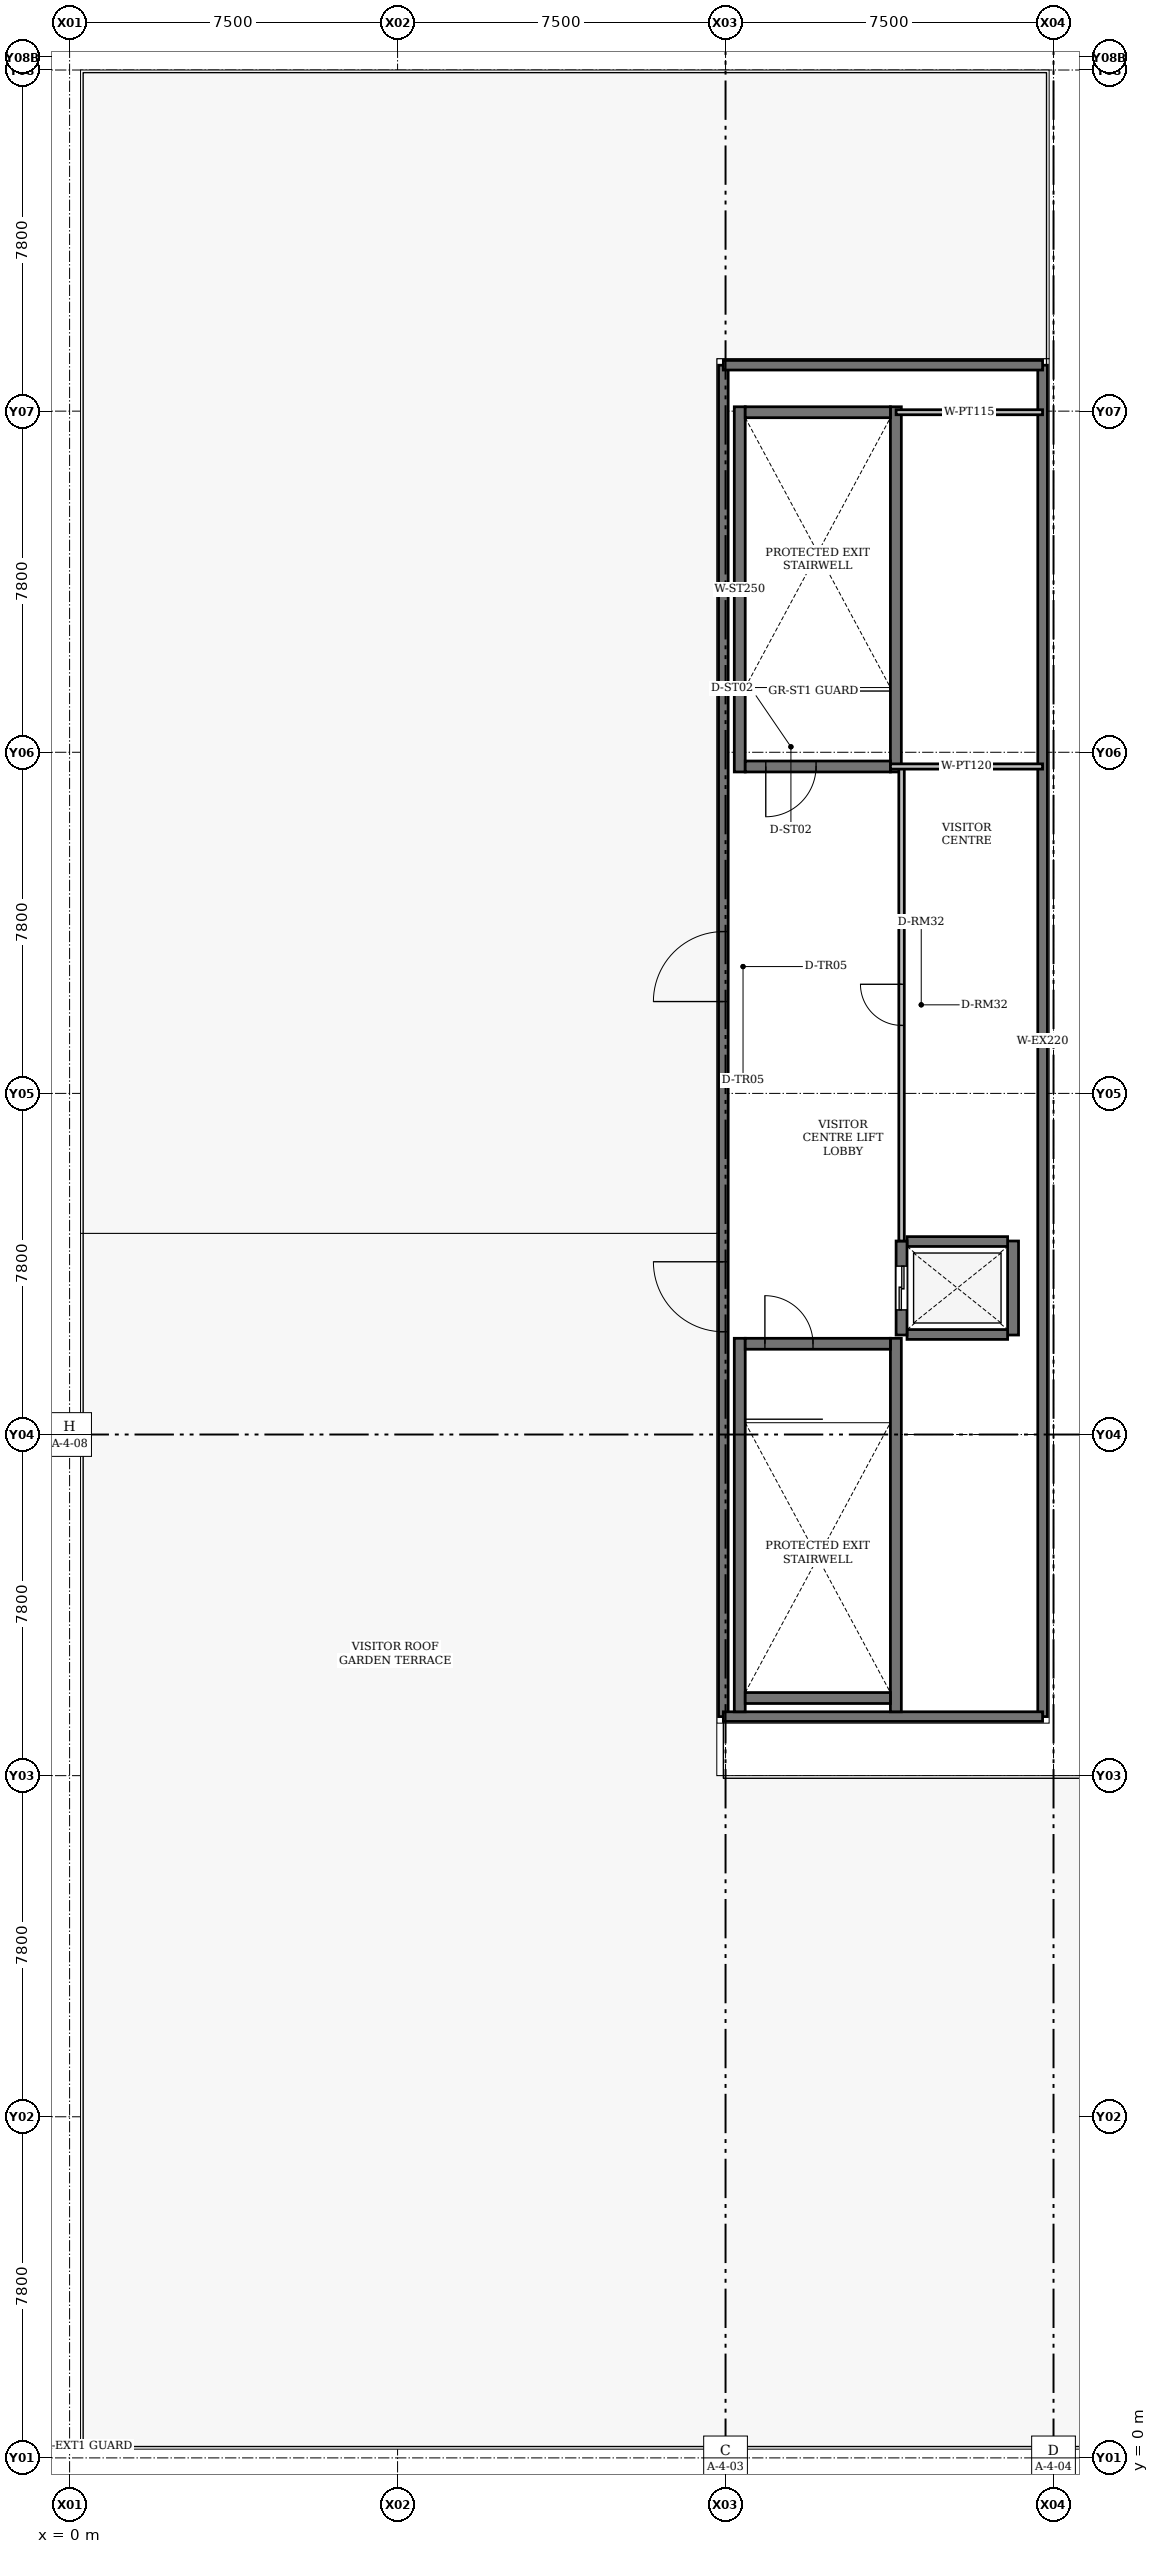
"""IFC4 building model, lengths in metres.
Left out: names, types, materials, properties, quantities, classifications, styles, units other than length and angle.
Written with IfcOpenShell. Run it as: python <this file> out.ifc"""

import sys

from ifc_helpers import new_model, si_unit, direction, frame, frame_2d, origin, place, context, subcontext, project, spatial, rectangle, extrude, element, fill, save


model = new_model("IFC4")
c1 = context("Model", 3, precision=1e-05, world=origin(), true_north=direction((0.0, 1.0)))
c2 = subcontext(c1, "Body", "Model", "MODEL_VIEW")
j1 = project(units=[si_unit("LENGTHUNIT", "METRE"), si_unit("PLANEANGLEUNIT", "RADIAN")], contexts=[c1])
p1 = place(None, origin())
s1 = spatial("IfcSite", under=j1, at=p1, CompositionType="ELEMENT")
p2 = place(p1, origin())
s2 = spatial("IfcBuilding", under=s1, at=p2, CompositionType="ELEMENT")
p3 = place(p2, frame((0.0, 0.0, 18.3)))
s3 = spatial("IfcBuildingStorey", under=s2, at=p3, CompositionType="ELEMENT", Elevation=18.3)
p4 = place(p3, frame((14.95, 16.95, 0.0), z_axis=(0.0, 0.0, 1.0), x_axis=(0.0, 1.0, 0.0)))
e1 = element("IfcWall", 1, at=p4, inside=s3, PredefinedType="SOLIDWALL", context=c2, shape_type="SweptSolid", body=[
    extrude(rectangle(XDim=30.9, YDim=0.22, at=frame_2d((15.45, 0.0))), origin(), (0.0, 0.0, 1.0), 3.985),
])
p5 = place(p4, frame((8.8, 0.0, 0.0)))
e2 = element("IfcOpeningElement", 2, at=p5, cuts=e1, PredefinedType="OPENING", context=c2, shape_type="SweptSolid", body=[
    extrude(rectangle(XDim=1.6, YDim=2.3, at=frame_2d((0.8, 1.15))), frame((0.0, 0.11, 0.0), z_axis=(0.0, -1.0, 0.0), x_axis=(1.0, 0.0, 0.0)), (0.0, 0.0, 1.0), 0.22),
])
p6 = place(p4, frame((16.35, 0.0, 0.0)))
e3 = element("IfcOpeningElement", 3, at=p6, cuts=e1, PredefinedType="OPENING", context=c2, shape_type="SweptSolid", body=[
    extrude(rectangle(XDim=1.6, YDim=2.3, at=frame_2d((0.8, 1.15))), frame((0.0, 0.11, 0.0), z_axis=(0.0, -1.0, 0.0), x_axis=(1.0, 0.0, 0.0)), (0.0, 0.0, 1.0), 0.22),
])
p7 = place(p3, frame((22.25, 47.85, 0.0), z_axis=(0.0, 0.0, 1.0), x_axis=(0.0, -1.0, 0.0)))
e4 = element("IfcWall", 4, at=p7, inside=s3, PredefinedType="SOLIDWALL", context=c2, shape_type="SweptSolid", body=[
    extrude(rectangle(XDim=30.9, YDim=0.22, at=frame_2d((15.45, 0.0))), origin(), (0.0, 0.0, 1.0), 3.985),
])
for number, where, z_axis, x_axis in (
    (5, (14.95, 47.85, 0.0), (0.0, 0.0, 1.0), (1.0, 0.0, 0.0)),
    (6, (22.25, 16.95, 0.0), (0.0, 0.0, 1.0), (-1.0, 0.0, 0.0)),
):
    element("IfcWall", number, at=place(p3, frame(where, z_axis=z_axis, x_axis=x_axis)), inside=s3, PredefinedType="SOLIDWALL", context=c2, shape_type="SweptSolid", body=[
        extrude(rectangle(XDim=7.3, YDim=0.22, at=frame_2d((3.65, 0.0))), origin(), (0.0, 0.0, 1.0), 3.985),
    ])
for number, where, z_axis, x_axis in (
    (7, (15.325, 17.06, 0.0), (0.0, 0.0, 1.0), (0.0, 1.0, 0.0)),
    (8, (18.895, 17.06, 0.0), (0.0, 0.0, 1.0), (0.0, 1.0, 0.0)),
):
    element("IfcWall", number, at=place(p3, frame(where, z_axis=z_axis, x_axis=x_axis)), inside=s3, PredefinedType="SHEAR", context=c2, shape_type="SweptSolid", body=[
        extrude(rectangle(XDim=8.54, YDim=0.25, at=frame_2d((4.27, 0.0))), origin(), (0.0, 0.0, 1.0), 4.2),
    ])
p8 = place(p3, frame((15.45, 17.375, 0.0), z_axis=(0.0, 0.0, 1.0), x_axis=(1.0, 0.0, 0.0)))
e9 = element("IfcWall", 9, at=p8, inside=s3, PredefinedType="SHEAR", context=c2, shape_type="SweptSolid", body=[
    extrude(rectangle(XDim=3.32, YDim=0.25, at=frame_2d((1.66, 0.0))), origin(), (0.0, 0.0, 1.0), 4.2),
])
p9 = place(p3, frame((15.45, 25.475, 0.0), z_axis=(0.0, 0.0, 1.0), x_axis=(1.0, 0.0, 0.0)))
e10 = element("IfcWall", 10, at=p9, inside=s3, PredefinedType="SHEAR", context=c2, shape_type="SweptSolid", body=[
    extrude(rectangle(XDim=3.32, YDim=0.25, at=frame_2d((1.66, 0.0))), origin(), (0.0, 0.0, 1.0), 4.2),
])
p10 = place(p9, frame((0.45, 0.0, 0.0)))
e11 = element("IfcOpeningElement", 11, at=p10, cuts=e10, PredefinedType="OPENING", context=c2, shape_type="SweptSolid", body=[
    extrude(rectangle(XDim=1.1, YDim=2.15, at=frame_2d((0.55, 1.075))), frame((0.0, 0.125, 0.0), z_axis=(0.0, -1.0, 0.0), x_axis=(1.0, 0.0, 0.0)), (0.0, 0.0, 1.0), 0.25),
])
for number, where, z_axis, x_axis in (
    (12, (15.325, 38.55, 0.0), (0.0, 0.0, 1.0), (0.0, 1.0, 0.0)),
    (13, (18.895, 38.55, 0.0), (0.0, 0.0, 1.0), (0.0, 1.0, 0.0)),
):
    element("IfcWall", number, at=place(p3, frame(where, z_axis=z_axis, x_axis=x_axis)), inside=s3, PredefinedType="SHEAR", context=c2, shape_type="SweptSolid", body=[
        extrude(rectangle(XDim=8.35, YDim=0.25, at=frame_2d((4.175, 0.0))), origin(), (0.0, 0.0, 1.0), 4.2),
    ])
p11 = place(p3, frame((15.45, 46.775, 0.0), z_axis=(0.0, 0.0, 1.0), x_axis=(1.0, 0.0, 0.0)))
e14 = element("IfcWall", 14, at=p11, inside=s3, PredefinedType="SHEAR", context=c2, shape_type="SweptSolid", body=[
    extrude(rectangle(XDim=3.32, YDim=0.25, at=frame_2d((1.66, 0.0))), origin(), (0.0, 0.0, 1.0), 4.2),
])
p12 = place(p3, frame((18.77, 38.675, 0.0), z_axis=(0.0, 0.0, 1.0), x_axis=(-1.0, 0.0, 0.0)))
e15 = element("IfcWall", 15, at=p12, inside=s3, PredefinedType="SHEAR", context=c2, shape_type="SweptSolid", body=[
    extrude(rectangle(XDim=3.32, YDim=0.25, at=frame_2d((1.66, 0.0))), origin(), (0.0, 0.0, 1.0), 4.2),
])
p13 = place(p12, frame((1.7, 0.0, 0.0)))
e16 = element("IfcOpeningElement", 16, at=p13, cuts=e15, PredefinedType="OPENING", context=c2, shape_type="SweptSolid", body=[
    extrude(rectangle(XDim=1.15, YDim=2.15, at=frame_2d((0.575, 1.075))), frame((0.0, 0.125, 0.0), z_axis=(0.0, -1.0, 0.0), x_axis=(1.0, 0.0, 0.0)), (0.0, 0.0, 1.0), 0.25),
])
p14 = place(p3, frame((21.575, 25.675, 0.0), z_axis=(0.0, 0.0, 1.0), x_axis=(0.0, 1.0, 0.0)))
e17 = element("IfcWall", 17, at=p14, inside=s3, PredefinedType="SHEAR", context=c2, shape_type="SweptSolid", body=[
    extrude(rectangle(XDim=2.15, YDim=0.25, at=frame_2d((1.075, 0.0))), origin(), (0.0, 0.0, 1.0), 4.2),
])
for number, where, z_axis, x_axis in (
    (18, (19.15, 25.688, 0.0), (0.0, 0.0, 1.0), (1.0, 0.0, 0.0)),
    (19, (19.15, 27.812, 0.0), (0.0, 0.0, 1.0), (1.0, 0.0, 0.0)),
):
    element("IfcWall", number, at=place(p3, frame(where, z_axis=z_axis, x_axis=x_axis)), inside=s3, PredefinedType="SHEAR", context=c2, shape_type="SweptSolid", body=[
        extrude(rectangle(XDim=2.3, YDim=0.225, at=frame_2d((1.15, 0.0))), origin(), (0.0, 0.0, 1.0), 4.2),
    ])
p15 = place(p3, frame((19.025, 25.675, 0.0), z_axis=(0.0, 0.0, 1.0), x_axis=(0.0, 1.0, 0.0)))
e20 = element("IfcWall", 20, at=p15, inside=s3, PredefinedType="SHEAR", context=c2, shape_type="SweptSolid", body=[
    extrude(rectangle(XDim=2.15, YDim=0.25, at=frame_2d((1.075, 0.0))), origin(), (0.0, 0.0, 1.0), 4.2),
])
p16 = place(p15, frame((0.575, 0.0, 0.0)))
e21 = element("IfcOpeningElement", 21, at=p16, cuts=e20, PredefinedType="OPENING", context=c2, shape_type="SweptSolid", body=[
    extrude(rectangle(XDim=1.0, YDim=2.1, at=frame_2d((0.5, 1.05))), frame((0.0, 0.125, 0.0), z_axis=(0.0, -1.0, 0.0), x_axis=(1.0, 0.0, 0.0)), (0.0, 0.0, 1.0), 0.25),
])
p17 = place(p3, frame((19.025, 27.825, 0.0), z_axis=(0.0, 0.0, 1.0), x_axis=(0.0, 1.0, 0.0)))
e22 = element("IfcWall", 22, at=p17, inside=s3, PredefinedType="PARTITIONING", context=c2, shape_type="SweptSolid", body=[
    extrude(rectangle(XDim=10.85, YDim=0.125, at=frame_2d((5.425, 0.0))), origin(), (0.0, 0.0, 1.0), 3.95),
])
p18 = place(p17, frame((4.93, 0.0, 0.0)))
e23 = element("IfcOpeningElement", 23, at=p18, cuts=e22, PredefinedType="OPENING", context=c2, shape_type="SweptSolid", body=[
    extrude(rectangle(XDim=0.94, YDim=2.08, at=frame_2d((0.47, 1.04))), frame((0.0, 0.062, 0.0), z_axis=(0.0, -1.0, 0.0), x_axis=(1.0, 0.0, 0.0)), (0.0, 0.0, 1.0), 0.125),
])
p19 = place(p3, frame((22.25, 38.675, 0.0), z_axis=(0.0, 0.0, 1.0), x_axis=(-1.0, 0.0, 0.0)))
e24 = element("IfcWall", 24, at=p19, inside=s3, PredefinedType="PARTITIONING", context=c2, shape_type="SweptSolid", body=[
    extrude(rectangle(XDim=3.48, YDim=0.12, at=frame_2d((1.74, 0.0))), origin(), (0.0, 0.0, 1.0), 3.95),
])
p20 = place(p3, frame((18.9, 46.775, 0.0), z_axis=(0.0, 0.0, 1.0), x_axis=(1.0, 0.0, 0.0)))
e25 = element("IfcWall", 25, at=p20, inside=s3, PredefinedType="PARTITIONING", context=c2, shape_type="SweptSolid", body=[
    extrude(rectangle(XDim=3.35, YDim=0.115, at=frame_2d((1.675, 0.0))), origin(), (0.0, 0.0, 1.0), 3.95),
])
p21 = place(p5, origin())
e26 = element("IfcDoor", 26, at=p21, inside=s3, OperationType="SINGLE_SWING_RIGHT", PredefinedType="DOOR", context=c2, shape_type="SweptSolid", body=[
    extrude(rectangle(XDim=1.6, YDim=2.3, at=frame_2d((0.8, 1.15))), frame((0.0, 0.025, 0.0), z_axis=(0.0, -1.0, 0.0), x_axis=(1.0, 0.0, 0.0)), (0.0, 0.0, 1.0), 0.05),
])
fill(e2, e26)
p22 = place(p6, origin())
e27 = element("IfcDoor", 27, at=p22, inside=s3, OperationType="SINGLE_SWING_LEFT", PredefinedType="DOOR", context=c2, shape_type="SweptSolid", body=[
    extrude(rectangle(XDim=1.6, YDim=2.3, at=frame_2d((0.8, 1.15))), frame((0.0, 0.025, 0.0), z_axis=(0.0, -1.0, 0.0), x_axis=(1.0, 0.0, 0.0)), (0.0, 0.0, 1.0), 0.05),
])
fill(e3, e27)
p23 = place(p10, origin())
e28 = element("IfcDoor", 28, at=p23, inside=s3, OperationType="SINGLE_SWING_LEFT", PredefinedType="DOOR", context=c2, shape_type="SweptSolid", body=[
    extrude(rectangle(XDim=1.1, YDim=2.15, at=frame_2d((0.55, 1.075))), frame((0.0, 0.025, 0.0), z_axis=(0.0, -1.0, 0.0), x_axis=(1.0, 0.0, 0.0)), (0.0, 0.0, 1.0), 0.05),
])
fill(e11, e28)
p24 = place(p13, origin())
e29 = element("IfcDoor", 29, at=p24, inside=s3, OperationType="SINGLE_SWING_RIGHT", PredefinedType="DOOR", context=c2, shape_type="SweptSolid", body=[
    extrude(rectangle(XDim=1.15, YDim=2.15, at=frame_2d((0.575, 1.075))), frame((0.0, 0.025, 0.0), z_axis=(0.0, -1.0, 0.0), x_axis=(1.0, 0.0, 0.0)), (0.0, 0.0, 1.0), 0.05),
])
fill(e16, e29)
p25 = place(p16, origin())
e30 = element("IfcDoor", 30, at=p25, inside=s3, OperationType="SLIDING_TO_LEFT", PredefinedType="DOOR", context=c2, shape_type="SweptSolid", body=[
    extrude(rectangle(XDim=1.0, YDim=2.1, at=frame_2d((0.5, 1.05))), frame((0.0, 0.025, 0.0), z_axis=(0.0, -1.0, 0.0), x_axis=(1.0, 0.0, 0.0)), (0.0, 0.0, 1.0), 0.05),
])
fill(e21, e30)
p26 = place(p18, origin())
e31 = element("IfcDoor", 31, at=p26, inside=s3, OperationType="SINGLE_SWING_RIGHT", PredefinedType="DOOR", context=c2, shape_type="SweptSolid", body=[
    extrude(rectangle(XDim=0.94, YDim=2.08, at=frame_2d((0.47, 1.04))), frame((0.0, 0.025, 0.0), z_axis=(0.0, -1.0, 0.0), x_axis=(1.0, 0.0, 0.0)), (0.0, 0.0, 1.0), 0.05),
])
fill(e23, e31)
save(model, sys.argv[1])
